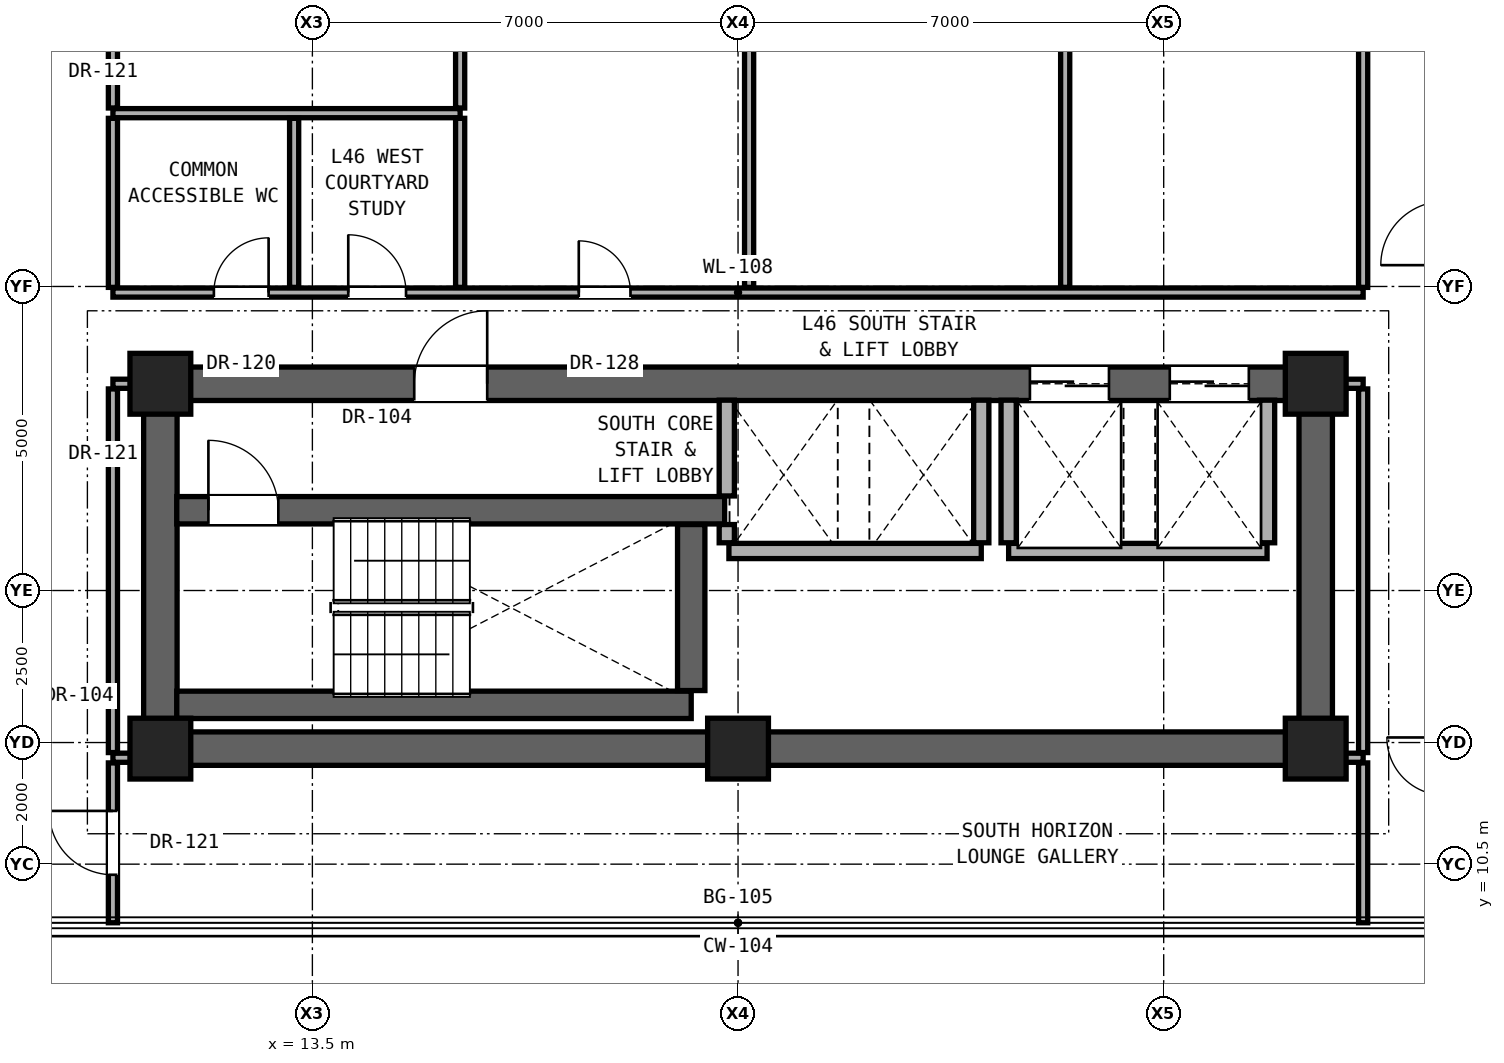
"""IFC4 building model, lengths in metres.
Left out: names, types, materials, properties, quantities, classifications, styles, units other than length and angle.
Written with IfcOpenShell. Run it as: python <this file> out.ifc"""

import sys

from ifc_helpers import new_model, si_unit, direction, frame, frame_2d, origin, origin_2d, place, context, subcontext, project, spatial, rectangle, extrude, element, fill, save


model = new_model("IFC4")
c1 = context("Model", 3, precision=1e-05, world=origin(), true_north=direction((0.0, 1.0)))
c2 = subcontext(c1, "Body", "Model", "MODEL_VIEW")
j1 = project(units=[si_unit("LENGTHUNIT", "METRE"), si_unit("PLANEANGLEUNIT", "RADIAN")], contexts=[c1])
p1 = place(None, origin())
s1 = spatial("IfcSite", under=j1, at=p1, CompositionType="ELEMENT")
p2 = place(p1, origin())
s2 = spatial("IfcBuilding", under=s1, at=p2, CompositionType="ELEMENT")
p3 = place(p2, frame((0.0, 0.0, 164.15)))
s3 = spatial("IfcBuildingStorey", under=s2, at=p3, CompositionType="ELEMENT", Elevation=164.15)
for number, where, z_axis, x_axis in (
    (1, (11.0, 12.4, 0.0), (0.0, 0.0, 1.0), (1.0, 0.0, 0.0)),
    (2, (20.5, 12.4, 0.0), (0.0, 0.0, 1.0), (1.0, 0.0, 0.0)),
    (3, (30.0, 12.4, 0.0), (0.0, 0.0, 1.0), (1.0, 0.0, 0.0)),
    (4, (11.0, 18.4, 0.0), (0.0, 0.0, 1.0), (1.0, 0.0, 0.0)),
    (5, (30.0, 18.4, 0.0), (0.0, 0.0, 1.0), (1.0, 0.0, 0.0)),
):
    element("IfcColumn", number, at=place(p3, frame(where, z_axis=z_axis, x_axis=x_axis)), inside=s3, PredefinedType="COLUMN", context=c2, shape_type="SweptSolid", body=[
        extrude(rectangle(XDim=1.0, YDim=1.0, at=origin_2d()), origin(), (0.0, 0.0, 1.0), 3.25),
    ])
p4 = place(p3, frame((11.0, 12.4, 0.0), z_axis=(0.0, 0.0, 1.0), x_axis=(1.0, 0.0, 0.0)))
e6 = element("IfcWall", 6, at=p4, inside=s3, PredefinedType="SHEAR", context=c2, shape_type="SweptSolid", body=[
    extrude(rectangle(XDim=19.0, YDim=0.55, at=frame_2d((9.5, 0.0))), origin(), (0.0, 0.0, 1.0), 3.05),
])
for number, where, z_axis, x_axis in (
    (7, (11.0, 12.4, 0.0), (0.0, 0.0, 1.0), (0.0, 1.0, 0.0)),
    (8, (30.0, 12.4, 0.0), (0.0, 0.0, 1.0), (0.0, 1.0, 0.0)),
):
    element("IfcWall", number, at=place(p3, frame(where, z_axis=z_axis, x_axis=x_axis)), inside=s3, PredefinedType="SHEAR", context=c2, shape_type="SweptSolid", body=[
        extrude(rectangle(XDim=6.0, YDim=0.55, at=frame_2d((3.0, 0.0))), origin(), (0.0, 0.0, 1.0), 3.05),
    ])
p5 = place(p3, frame((11.0, 18.4, 0.0), z_axis=(0.0, 0.0, 1.0), x_axis=(1.0, 0.0, 0.0)))
e9 = element("IfcWall", 9, at=p5, inside=s3, PredefinedType="SHEAR", context=c2, shape_type="SweptSolid", body=[
    extrude(rectangle(XDim=19.0, YDim=0.55, at=frame_2d((9.5, 0.0))), origin(), (0.0, 0.0, 1.0), 3.05),
])
p6 = place(p5, frame((4.175, 0.0, 0.0)))
e10 = element("IfcOpeningElement", 10, at=p6, cuts=e9, PredefinedType="OPENING", context=c2, shape_type="SweptSolid", body=[
    extrude(rectangle(XDim=1.2, YDim=2.25, at=frame_2d((0.6, 1.125))), frame((0.0, 0.285, 0.0), z_axis=(0.0, -1.0, 0.0), x_axis=(1.0, 0.0, 0.0)), (0.0, 0.0, 1.0), 0.57),
])
p7 = place(p5, frame((14.3, 0.0, 0.0)))
e11 = element("IfcOpeningElement", 11, at=p7, cuts=e9, PredefinedType="OPENING", context=c2, shape_type="SweptSolid", body=[
    extrude(rectangle(XDim=1.3, YDim=2.3, at=frame_2d((0.65, 1.15))), frame((0.0, 0.285, 0.0), z_axis=(0.0, -1.0, 0.0), x_axis=(1.0, 0.0, 0.0)), (0.0, 0.0, 1.0), 0.57),
])
p8 = place(p5, frame((16.6, 0.0, 0.0)))
e12 = element("IfcOpeningElement", 12, at=p8, cuts=e9, PredefinedType="OPENING", context=c2, shape_type="SweptSolid", body=[
    extrude(rectangle(XDim=1.3, YDim=2.3, at=frame_2d((0.65, 1.15))), frame((0.0, 0.285, 0.0), z_axis=(0.0, -1.0, 0.0), x_axis=(1.0, 0.0, 0.0)), (0.0, 0.0, 1.0), 0.57),
])
for number, where, z_axis, x_axis in (
    (13, (10.22, 12.25, 0.0), (0.0, 0.0, 1.0), (1.0, 0.0, 0.0)),
    (14, (30.27, 12.25, 0.0), (0.0, 0.0, 1.0), (1.0, 0.0, 0.0)),
):
    element("IfcWall", number, at=place(p3, frame(where, z_axis=z_axis, x_axis=x_axis)), inside=s3, PredefinedType="PARTITIONING", context=c2, shape_type="SweptSolid", body=[
        extrude(rectangle(XDim=0.51, YDim=0.15, at=frame_2d((0.255, 0.0))), origin(), (0.0, 0.0, 1.0), 3.05),
    ])
p9 = place(p3, frame((11.27, 13.12, 0.0), z_axis=(0.0, 0.0, 1.0), x_axis=(1.0, 0.0, 0.0)))
e15 = element("IfcWall", 15, at=p9, inside=s3, PredefinedType="SHEAR", context=c2, shape_type="SweptSolid", body=[
    extrude(rectangle(XDim=8.46, YDim=0.45, at=frame_2d((4.23, 0.0))), origin(), (0.0, 0.0, 1.0), 3.05),
])
p10 = place(p3, frame((20.35, 15.65, 0.0), z_axis=(0.0, 0.0, 1.0), x_axis=(1.0, 0.0, 0.0)))
e16 = element("IfcWall", 16, at=p10, inside=s3, PredefinedType="SOLIDWALL", context=c2, shape_type="SweptSolid", body=[
    extrude(rectangle(XDim=4.15, YDim=0.25, at=frame_2d((2.075, 0.0))), origin(), (0.0, 0.0, 1.0), 3.05),
])
p11 = place(p3, frame((24.95, 15.65, 0.0), z_axis=(0.0, 0.0, 1.0), x_axis=(1.0, 0.0, 0.0)))
e17 = element("IfcWall", 17, at=p11, inside=s3, PredefinedType="SOLIDWALL", context=c2, shape_type="SweptSolid", body=[
    extrude(rectangle(XDim=4.25, YDim=0.25, at=frame_2d((2.125, 0.0))), origin(), (0.0, 0.0, 1.0), 3.05),
])
p12 = place(p3, frame((11.27, 16.32, 0.0), z_axis=(0.0, 0.0, 1.0), x_axis=(1.0, 0.0, 0.0)))
e18 = element("IfcWall", 18, at=p12, inside=s3, PredefinedType="SHEAR", context=c2, shape_type="SweptSolid", body=[
    extrude(rectangle(XDim=9.01, YDim=0.45, at=frame_2d((4.505, 0.0))), origin(), (0.0, 0.0, 1.0), 3.05),
])
p13 = place(p12, frame((0.52, 0.0, 0.0)))
e19 = element("IfcOpeningElement", 19, at=p13, cuts=e18, PredefinedType="OPENING", context=c2, shape_type="SweptSolid", body=[
    extrude(rectangle(XDim=1.15, YDim=2.2, at=frame_2d((0.575, 1.1))), frame((0.0, 0.235, 0.0), z_axis=(0.0, -1.0, 0.0), x_axis=(1.0, 0.0, 0.0)), (0.0, 0.0, 1.0), 0.47),
])
for number, where, z_axis, x_axis in (
    (20, (10.22, 18.4, 0.0), (0.0, 0.0, 1.0), (1.0, 0.0, 0.0)),
    (21, (30.27, 18.4, 0.0), (0.0, 0.0, 1.0), (1.0, 0.0, 0.0)),
):
    element("IfcWall", number, at=place(p3, frame(where, z_axis=z_axis, x_axis=x_axis)), inside=s3, PredefinedType="PARTITIONING", context=c2, shape_type="SweptSolid", body=[
        extrude(rectangle(XDim=0.51, YDim=0.15, at=frame_2d((0.255, 0.0))), origin(), (0.0, 0.0, 1.0), 2.442),
    ])
p14 = place(p3, frame((10.22, 19.9, 0.0), z_axis=(0.0, 0.0, 1.0), x_axis=(1.0, 0.0, 0.0)))
e22 = element("IfcWall", 22, at=p14, inside=s3, PredefinedType="PARTITIONING", context=c2, shape_type="SweptSolid", body=[
    extrude(rectangle(XDim=20.56, YDim=0.15, at=frame_2d((10.28, 0.0))), origin(), (0.0, 0.0, 1.0), 2.186),
])
p15 = place(p14, frame((1.66, 0.0, 0.0)))
e23 = element("IfcOpeningElement", 23, at=p15, cuts=e22, PredefinedType="OPENING", context=c2, shape_type="SweptSolid", body=[
    extrude(rectangle(XDim=0.9, YDim=2.1, at=frame_2d((0.45, 1.05))), frame((0.0, 0.085, 0.0), z_axis=(0.0, -1.0, 0.0), x_axis=(1.0, 0.0, 0.0)), (0.0, 0.0, 1.0), 0.17),
])
p16 = place(p14, frame((3.87, 0.0, 0.0)))
e24 = element("IfcOpeningElement", 24, at=p16, cuts=e22, PredefinedType="OPENING", context=c2, shape_type="SweptSolid", body=[
    extrude(rectangle(XDim=0.95, YDim=2.15, at=frame_2d((0.475, 1.075))), frame((0.0, 0.085, 0.0), z_axis=(0.0, -1.0, 0.0), x_axis=(1.0, 0.0, 0.0)), (0.0, 0.0, 1.0), 0.17),
])
p17 = place(p14, frame((7.661, 0.0, 0.0)))
e25 = element("IfcOpeningElement", 25, at=p17, cuts=e22, PredefinedType="OPENING", context=c2, shape_type="SweptSolid", body=[
    extrude(rectangle(XDim=0.85, YDim=2.01, at=frame_2d((0.425, 1.005))), frame((0.0, 0.085, 0.0), z_axis=(0.0, -1.0, 0.0), x_axis=(1.0, 0.0, 0.0)), (0.0, 0.0, 1.0), 0.17),
])
p18 = place(p3, frame((10.22, 22.85, 0.0), z_axis=(0.0, 0.0, 1.0), x_axis=(1.0, 0.0, 0.0)))
e26 = element("IfcWall", 26, at=p18, inside=s3, PredefinedType="PARTITIONING", context=c2, shape_type="SweptSolid", body=[
    extrude(rectangle(XDim=5.71, YDim=0.15, at=frame_2d((2.855, 0.0))), origin(), (0.0, 0.0, 1.0), 2.186),
])
p19 = place(p3, frame((10.22, 9.536, 0.0), z_axis=(0.0, 0.0, 1.0), x_axis=(0.0, 1.0, 0.0)))
e27 = element("IfcWall", 27, at=p19, inside=s3, PredefinedType="PARTITIONING", context=c2, shape_type="SweptSolid", body=[
    extrude(rectangle(XDim=2.629, YDim=0.15, at=frame_2d((1.314, 0.0))), origin(), (0.0, 0.0, 1.0), 3.05),
])
p20 = place(p19, frame((0.79, 0.0, 0.0)))
e28 = element("IfcOpeningElement", 28, at=p20, cuts=e27, PredefinedType="OPENING", context=c2, shape_type="SweptSolid", body=[
    extrude(rectangle(XDim=1.05, YDim=2.2, at=frame_2d((0.525, 1.1))), frame((0.0, 0.085, 0.0), z_axis=(0.0, -1.0, 0.0), x_axis=(1.0, 0.0, 0.0)), (0.0, 0.0, 1.0), 0.17),
])
p21 = place(p3, frame((10.22, 12.335, 0.0), z_axis=(0.0, 0.0, 1.0), x_axis=(0.0, 1.0, 0.0)))
e29 = element("IfcWall", 29, at=p21, inside=s3, PredefinedType="PARTITIONING", context=c2, shape_type="SweptSolid", body=[
    extrude(rectangle(XDim=5.98, YDim=0.15, at=frame_2d((2.99, 0.0))), origin(), (0.0, 0.0, 1.0), 2.442),
])
p22 = place(p3, frame((10.22, 19.985, 0.0), z_axis=(0.0, 0.0, 1.0), x_axis=(0.0, 1.0, 0.0)))
e30 = element("IfcWall", 30, at=p22, inside=s3, PredefinedType="PARTITIONING", context=c2, shape_type="SweptSolid", body=[
    extrude(rectangle(XDim=2.78, YDim=0.15, at=frame_2d((1.39, 0.0))), origin(), (0.0, 0.0, 1.0), 3.05),
])
p23 = place(p3, frame((10.22, 22.935, 0.0), z_axis=(0.0, 0.0, 1.0), x_axis=(0.0, 1.0, 0.0)))
e31 = element("IfcWall", 31, at=p23, inside=s3, PredefinedType="PARTITIONING", context=c2, shape_type="SweptSolid", body=[
    extrude(rectangle(XDim=10.08, YDim=0.15, at=frame_2d((5.04, 0.0))), origin(), (0.0, 0.0, 1.0), 2.346),
])
p24 = place(p23, frame((4.565, 0.0, 0.0)))
e32 = element("IfcOpeningElement", 32, at=p24, cuts=e31, PredefinedType="OPENING", context=c2, shape_type="SweptSolid", body=[
    extrude(rectangle(XDim=0.95, YDim=2.15, at=frame_2d((0.475, 1.075))), frame((0.0, 0.085, 0.0), z_axis=(0.0, -1.0, 0.0), x_axis=(1.0, 0.0, 0.0)), (0.0, 0.0, 1.0), 0.17),
])
for number, where, z_axis, x_axis in (
    (33, (13.2, 19.985, 0.0), (0.0, 0.0, 1.0), (0.0, 1.0, 0.0)),
    (34, (15.93, 19.985, 0.0), (0.0, 0.0, 1.0), (0.0, 1.0, 0.0)),
):
    element("IfcWall", number, at=place(p3, frame(where, z_axis=z_axis, x_axis=x_axis)), inside=s3, PredefinedType="PARTITIONING", context=c2, shape_type="SweptSolid", body=[
        extrude(rectangle(XDim=2.78, YDim=0.15, at=frame_2d((1.39, 0.0))), origin(), (0.0, 0.0, 1.0), 3.05),
    ])
p25 = place(p3, frame((15.93, 22.935, 0.0), z_axis=(0.0, 0.0, 1.0), x_axis=(0.0, 1.0, 0.0)))
e35 = element("IfcWall", 35, at=p25, inside=s3, PredefinedType="PARTITIONING", context=c2, shape_type="SweptSolid", body=[
    extrude(rectangle(XDim=10.08, YDim=0.15, at=frame_2d((5.04, 0.0))), origin(), (0.0, 0.0, 1.0), 2.186),
])
p26 = place(p3, frame((19.73, 13.355, 0.0), z_axis=(0.0, 0.0, 1.0), x_axis=(0.0, 1.0, 0.0)))
e36 = element("IfcWall", 36, at=p26, inside=s3, PredefinedType="SHEAR", context=c2, shape_type="SweptSolid", body=[
    extrude(rectangle(XDim=2.73, YDim=0.45, at=frame_2d((1.365, 0.0))), origin(), (0.0, 0.0, 1.0), 3.05),
])
p27 = place(p3, frame((20.315, 15.785, 0.0), z_axis=(0.0, 0.0, 1.0), x_axis=(0.0, 1.0, 0.0)))
e37 = element("IfcWall", 37, at=p27, inside=s3, PredefinedType="SOLIDWALL", context=c2, shape_type="SweptSolid", body=[
    extrude(rectangle(XDim=0.3, YDim=0.25, at=frame_2d((0.15, 0.0))), origin(), (0.0, 0.0, 1.0), 3.05),
])
p28 = place(p3, frame((20.315, 16.555, 0.0), z_axis=(0.0, 0.0, 1.0), x_axis=(0.0, 1.0, 0.0)))
e38 = element("IfcWall", 38, at=p28, inside=s3, PredefinedType="SOLIDWALL", context=c2, shape_type="SweptSolid", body=[
    extrude(rectangle(XDim=1.575, YDim=0.25, at=frame_2d((0.788, 0.0))), origin(), (0.0, 0.0, 1.0), 3.05),
])
p29 = place(p3, frame((20.682, 19.985, 0.0), z_axis=(0.0, 0.0, 1.0), x_axis=(0.0, 1.0, 0.0)))
e39 = element("IfcWall", 39, at=p29, inside=s3, PredefinedType="PARTITIONING", context=c2, shape_type="SweptSolid", body=[
    extrude(rectangle(XDim=13.03, YDim=0.15, at=frame_2d((6.515, 0.0))), origin(), (0.0, 0.0, 1.0), 2.186),
])
for number, where, z_axis, x_axis in (
    (40, (24.5, 15.785, 0.0), (0.0, 0.0, 1.0), (0.0, 1.0, 0.0)),
    (41, (24.95, 15.785, 0.0), (0.0, 0.0, 1.0), (0.0, 1.0, 0.0)),
):
    element("IfcWall", number, at=place(p3, frame(where, z_axis=z_axis, x_axis=x_axis)), inside=s3, PredefinedType="SOLIDWALL", context=c2, shape_type="SweptSolid", body=[
        extrude(rectangle(XDim=2.345, YDim=0.25, at=frame_2d((1.172, 0.0))), origin(), (0.0, 0.0, 1.0), 3.05),
    ])
p30 = place(p3, frame((25.88, 19.985, 0.0), z_axis=(0.0, 0.0, 1.0), x_axis=(0.0, 1.0, 0.0)))
e42 = element("IfcWall", 42, at=p30, inside=s3, PredefinedType="PARTITIONING", context=c2, shape_type="SweptSolid", body=[
    extrude(rectangle(XDim=13.03, YDim=0.15, at=frame_2d((6.515, 0.0))), origin(), (0.0, 0.0, 1.0), 2.186),
])
p31 = place(p3, frame((29.2, 15.785, 0.0), z_axis=(0.0, 0.0, 1.0), x_axis=(0.0, 1.0, 0.0)))
e43 = element("IfcWall", 43, at=p31, inside=s3, PredefinedType="SOLIDWALL", context=c2, shape_type="SweptSolid", body=[
    extrude(rectangle(XDim=2.345, YDim=0.25, at=frame_2d((1.172, 0.0))), origin(), (0.0, 0.0, 1.0), 3.05),
])
p32 = place(p3, frame((30.78, 9.536, 0.0), z_axis=(0.0, 0.0, 1.0), x_axis=(0.0, 1.0, 0.0)))
e44 = element("IfcWall", 44, at=p32, inside=s3, PredefinedType="PARTITIONING", context=c2, shape_type="SweptSolid", body=[
    extrude(rectangle(XDim=2.629, YDim=0.15, at=frame_2d((1.314, 0.0))), origin(), (0.0, 0.0, 1.0), 3.05),
])
p33 = place(p3, frame((30.78, 12.335, 0.0), z_axis=(0.0, 0.0, 1.0), x_axis=(0.0, 1.0, 0.0)))
e45 = element("IfcWall", 45, at=p33, inside=s3, PredefinedType="PARTITIONING", context=c2, shape_type="SweptSolid", body=[
    extrude(rectangle(XDim=5.98, YDim=0.15, at=frame_2d((2.99, 0.0))), origin(), (0.0, 0.0, 1.0), 2.442),
])
p34 = place(p3, frame((30.78, 19.985, 0.0), z_axis=(0.0, 0.0, 1.0), x_axis=(0.0, 1.0, 0.0)))
e46 = element("IfcWall", 46, at=p34, inside=s3, PredefinedType="PARTITIONING", context=c2, shape_type="SweptSolid", body=[
    extrude(rectangle(XDim=13.03, YDim=0.15, at=frame_2d((6.515, 0.0))), origin(), (0.0, 0.0, 1.0), 2.346),
])
p35 = place(p6, origin())
e47 = element("IfcDoor", 47, at=p35, inside=s3, OperationType="SINGLE_SWING_RIGHT", PredefinedType="DOOR", context=c2, shape_type="SweptSolid", body=[
    extrude(rectangle(XDim=1.2, YDim=2.25, at=frame_2d((0.6, 1.125))), frame((0.0, 0.025, 0.0), z_axis=(0.0, -1.0, 0.0), x_axis=(1.0, 0.0, 0.0)), (0.0, 0.0, 1.0), 0.05),
])
fill(e10, e47)
p36 = place(p13, origin())
e48 = element("IfcDoor", 48, at=p36, inside=s3, OperationType="SINGLE_SWING_LEFT", PredefinedType="DOOR", context=c2, shape_type="SweptSolid", body=[
    extrude(rectangle(XDim=1.15, YDim=2.2, at=frame_2d((0.575, 1.1))), frame((0.0, 0.025, 0.0), z_axis=(0.0, -1.0, 0.0), x_axis=(1.0, 0.0, 0.0)), (0.0, 0.0, 1.0), 0.05),
])
fill(e19, e48)
p37 = place(p15, origin())
e49 = element("IfcDoor", 49, at=p37, inside=s3, OperationType="SINGLE_SWING_RIGHT", PredefinedType="DOOR", context=c2, shape_type="SweptSolid", body=[
    extrude(rectangle(XDim=0.9, YDim=2.1, at=frame_2d((0.45, 1.05))), frame((0.0, 0.025, 0.0), z_axis=(0.0, -1.0, 0.0), x_axis=(1.0, 0.0, 0.0)), (0.0, 0.0, 1.0), 0.05),
])
fill(e23, e49)
p38 = place(p16, origin())
e50 = element("IfcDoor", 50, at=p38, inside=s3, OperationType="SINGLE_SWING_LEFT", PredefinedType="DOOR", context=c2, shape_type="SweptSolid", body=[
    extrude(rectangle(XDim=0.95, YDim=2.15, at=frame_2d((0.475, 1.075))), frame((0.0, 0.025, 0.0), z_axis=(0.0, -1.0, 0.0), x_axis=(1.0, 0.0, 0.0)), (0.0, 0.0, 1.0), 0.05),
])
fill(e24, e50)
p39 = place(p17, origin())
e51 = element("IfcDoor", 51, at=p39, inside=s3, OperationType="SINGLE_SWING_LEFT", PredefinedType="DOOR", context=c2, shape_type="SweptSolid", body=[
    extrude(rectangle(XDim=0.85, YDim=2.01, at=frame_2d((0.425, 1.005))), frame((0.0, 0.025, 0.0), z_axis=(0.0, -1.0, 0.0), x_axis=(1.0, 0.0, 0.0)), (0.0, 0.0, 1.0), 0.05),
])
fill(e25, e51)
p40 = place(p20, origin())
e52 = element("IfcDoor", 52, at=p40, inside=s3, OperationType="SINGLE_SWING_RIGHT", PredefinedType="DOOR", context=c2, shape_type="SweptSolid", body=[
    extrude(rectangle(XDim=1.05, YDim=2.2, at=frame_2d((0.525, 1.1))), frame((0.0, 0.025, 0.0), z_axis=(0.0, -1.0, 0.0), x_axis=(1.0, 0.0, 0.0)), (0.0, 0.0, 1.0), 0.05),
])
fill(e28, e52)
p41 = place(p7, origin())
e53 = element("IfcDoor", 53, at=p41, inside=s3, OperationType="DOUBLE_DOOR_SLIDING", PredefinedType="DOOR", context=c2, shape_type="SweptSolid", body=[
    extrude(rectangle(XDim=1.3, YDim=2.3, at=frame_2d((0.65, 1.15))), frame((0.0, 0.025, 0.0), z_axis=(0.0, -1.0, 0.0), x_axis=(1.0, 0.0, 0.0)), (0.0, 0.0, 1.0), 0.05),
])
fill(e11, e53)
p42 = place(p8, origin())
e54 = element("IfcDoor", 54, at=p42, inside=s3, OperationType="DOUBLE_DOOR_SLIDING", PredefinedType="DOOR", context=c2, shape_type="SweptSolid", body=[
    extrude(rectangle(XDim=1.3, YDim=2.3, at=frame_2d((0.65, 1.15))), frame((0.0, 0.025, 0.0), z_axis=(0.0, -1.0, 0.0), x_axis=(1.0, 0.0, 0.0)), (0.0, 0.0, 1.0), 0.05),
])
fill(e12, e54)
save(model, sys.argv[1])
